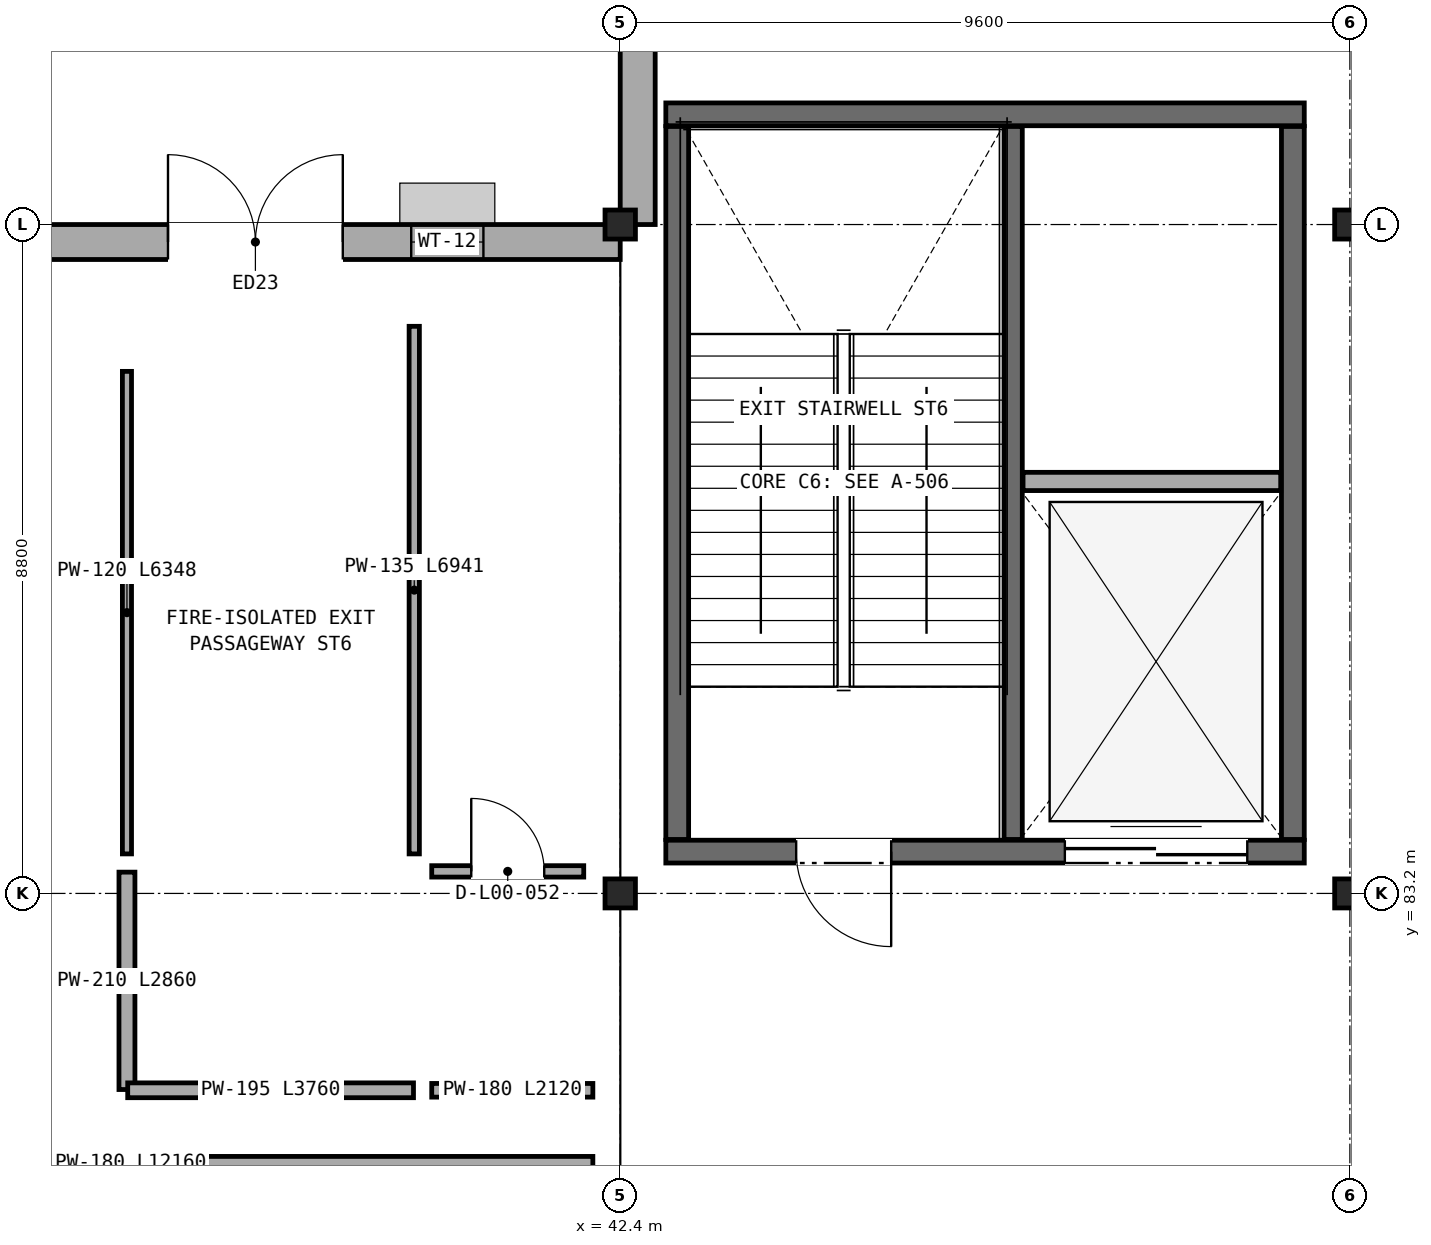
"""IFC4 building model, lengths in metres.
Left out: names, types, materials, properties, quantities, classifications, styles, units other than length and angle.
Written with IfcOpenShell. Run it as: python <this file> out.ifc"""

import sys

from ifc_helpers import new_model, si_unit, direction, frame, frame_2d, origin, origin_2d, place, context, subcontext, project, spatial, rectangle, i_section, extrude, element, fill, save


model = new_model("IFC4")
c1 = context("Model", 3, precision=1e-05, world=origin(), true_north=direction((0.0, 1.0)))
c2 = subcontext(c1, "Body", "Model", "MODEL_VIEW")
j1 = project(units=[si_unit("LENGTHUNIT", "METRE"), si_unit("PLANEANGLEUNIT", "RADIAN")], contexts=[c1])
p1 = place(None, origin())
s1 = spatial("IfcSite", under=j1, at=p1, CompositionType="ELEMENT")
p2 = place(p1, origin())
s2 = spatial("IfcBuilding", under=s1, at=p2, CompositionType="ELEMENT")
p3 = place(p2, origin())
s3 = spatial("IfcBuildingStorey", under=s2, at=p3, CompositionType="ELEMENT", Elevation=0.0)
for number, where, z_axis, x_axis in (
    (1, (42.4, 83.2, 0.0), (0.0, 0.0, 1.0), (1.0, 0.0, 0.0)),
    (2, (42.4, 92.0, 0.0), (0.0, 0.0, 1.0), (1.0, 0.0, 0.0)),
    (3, (52.0, 83.2, 0.0), (0.0, 0.0, 1.0), (1.0, 0.0, 0.0)),
    (4, (52.0, 92.0, 0.0), (0.0, 0.0, 1.0), (1.0, 0.0, 0.0)),
):
    element("IfcColumn", number, at=place(p3, frame(where, z_axis=z_axis, x_axis=x_axis)), inside=s3, PredefinedType="COLUMN", context=c2, shape_type="SweptSolid", body=[
        extrude(i_section(OverallWidth=0.4, OverallDepth=0.382, WebThickness=0.025, FlangeThickness=0.036, at=origin_2d()), origin(), (0.0, 0.0, 1.0), 5.6),
    ])
p4 = place(p3, frame((42.63, 114.964, 0.0), z_axis=(0.0, 0.0, 1.0), x_axis=(0.0, -1.0, 0.0)))
e5 = element("IfcWall", 5, at=p4, inside=s3, PredefinedType="SOLIDWALL", context=c2, shape_type="SweptSolid", body=[
    extrude(rectangle(XDim=22.964, YDim=0.46, at=frame_2d((11.482, 0.0))), origin(), (0.0, 0.0, 1.0), 4.653),
])
p5 = place(p4, frame((1.8, 0.0, 0.9)))
e6 = element("IfcOpeningElement", 6, at=p5, cuts=e5, PredefinedType="OPENING", context=c2, shape_type="SweptSolid", body=[
    extrude(rectangle(XDim=2.4, YDim=1.55, at=frame_2d((1.2, 0.775))), frame((0.0, 0.24, 0.0), z_axis=(0.0, -1.0, 0.0), x_axis=(1.0, 0.0, 0.0)), (0.0, 0.0, 1.0), 0.48),
])
p6 = place(p4, frame((15.6, 0.0, 0.9)))
e7 = element("IfcOpeningElement", 7, at=p6, cuts=e5, PredefinedType="OPENING", context=c2, shape_type="SweptSolid", body=[
    extrude(rectangle(XDim=2.65, YDim=1.55, at=frame_2d((1.325, 0.775))), frame((0.0, 0.24, 0.0), z_axis=(0.0, -1.0, 0.0), x_axis=(1.0, 0.0, 0.0)), (0.0, 0.0, 1.0), 0.48),
])
p7 = place(p3, frame((42.4, 91.77, 0.0), z_axis=(0.0, 0.0, 1.0), x_axis=(-1.0, 0.0, 0.0)))
e8 = element("IfcWall", 8, at=p7, inside=s3, PredefinedType="SOLIDWALL", context=c2, shape_type="SweptSolid", body=[
    extrude(rectangle(XDim=28.8, YDim=0.46, at=frame_2d((14.4, 0.0))), origin(), (0.0, 0.0, 1.0), 4.723),
])
p8 = place(p7, frame((22.775, 0.0, 0.0)))
e9 = element("IfcOpeningElement", 9, at=p8, cuts=e8, PredefinedType="OPENING", context=c2, shape_type="SweptSolid", body=[
    extrude(rectangle(XDim=2.45, YDim=2.5, at=frame_2d((1.225, 1.25))), frame((0.0, 0.24, 0.0), z_axis=(0.0, -1.0, 0.0), x_axis=(1.0, 0.0, 0.0)), (0.0, 0.0, 1.0), 0.48),
])
p9 = place(p7, frame((13.2, 0.0, 0.0)))
e10 = element("IfcOpeningElement", 10, at=p9, cuts=e8, PredefinedType="OPENING", context=c2, shape_type="SweptSolid", body=[
    extrude(rectangle(XDim=2.4, YDim=2.45, at=frame_2d((1.2, 1.225))), frame((0.0, 0.24, 0.0), z_axis=(0.0, -1.0, 0.0), x_axis=(1.0, 0.0, 0.0)), (0.0, 0.0, 1.0), 0.48),
])
p10 = place(p7, frame((3.65, 0.0, 0.0)))
e11 = element("IfcOpeningElement", 11, at=p10, cuts=e8, PredefinedType="OPENING", context=c2, shape_type="SweptSolid", body=[
    extrude(rectangle(XDim=2.3, YDim=2.4, at=frame_2d((1.15, 1.2))), frame((0.0, 0.24, 0.0), z_axis=(0.0, -1.0, 0.0), x_axis=(1.0, 0.0, 0.0)), (0.0, 0.0, 1.0), 0.48),
])
p11 = place(p7, frame((1.8, 0.0, 0.9)))
e12 = element("IfcOpeningElement", 12, at=p11, cuts=e8, PredefinedType="OPENING", context=c2, shape_type="SweptSolid", body=[
    extrude(rectangle(XDim=0.95, YDim=1.85, at=frame_2d((0.475, 0.925))), frame((0.0, 0.24, 0.0), z_axis=(0.0, -1.0, 0.0), x_axis=(1.0, 0.0, 0.0)), (0.0, 0.0, 1.0), 0.48),
])
p12 = place(p7, frame((11.0, 0.0, 0.9)))
e13 = element("IfcOpeningElement", 13, at=p12, cuts=e8, PredefinedType="OPENING", context=c2, shape_type="SweptSolid", body=[
    extrude(rectangle(XDim=1.1, YDim=1.85, at=frame_2d((0.55, 0.925))), frame((0.0, 0.24, 0.0), z_axis=(0.0, -1.0, 0.0), x_axis=(1.0, 0.0, 0.0)), (0.0, 0.0, 1.0), 0.48),
])
p13 = place(p7, frame((20.2, 0.0, 0.9)))
e14 = element("IfcOpeningElement", 14, at=p13, cuts=e8, PredefinedType="OPENING", context=c2, shape_type="SweptSolid", body=[
    extrude(rectangle(XDim=1.25, YDim=1.85, at=frame_2d((0.625, 0.925))), frame((0.0, 0.24, 0.0), z_axis=(0.0, -1.0, 0.0), x_axis=(1.0, 0.0, 0.0)), (0.0, 0.0, 1.0), 0.48),
])
p14 = place(p3, frame((43.0, 83.75, 0.0), z_axis=(0.0, 0.0, 1.0), x_axis=(1.0, 0.0, 0.0)))
e15 = element("IfcWall", 15, at=p14, inside=s3, PredefinedType="SHEAR", context=c2, shape_type="SweptSolid", body=[
    extrude(rectangle(XDim=8.4, YDim=0.3, at=frame_2d((4.2, 0.0))), origin(), (0.0, 0.0, 1.0), 5.275),
])
p15 = place(p14, frame((1.715, 0.0, 0.0)))
e16 = element("IfcOpeningElement", 16, at=p15, cuts=e15, PredefinedType="OPENING", context=c2, shape_type="SweptSolid", body=[
    extrude(rectangle(XDim=1.25, YDim=2.2, at=frame_2d((0.625, 1.1))), frame((0.0, 0.16, 0.0), z_axis=(0.0, -1.0, 0.0), x_axis=(1.0, 0.0, 0.0)), (0.0, 0.0, 1.0), 0.32),
])
p16 = place(p14, frame((5.25, 0.0, 0.0)))
e17 = element("IfcOpeningElement", 17, at=p16, cuts=e15, PredefinedType="OPENING", context=c2, shape_type="SweptSolid", body=[
    extrude(rectangle(XDim=2.4, YDim=2.55, at=frame_2d((1.2, 1.275))), frame((0.0, 0.16, 0.0), z_axis=(0.0, -1.0, 0.0), x_axis=(1.0, 0.0, 0.0)), (0.0, 0.0, 1.0), 0.32),
])
p17 = place(p3, frame((51.4, 93.45, 0.0), z_axis=(0.0, 0.0, 1.0), x_axis=(-1.0, 0.0, 0.0)))
e18 = element("IfcWall", 18, at=p17, inside=s3, PredefinedType="SHEAR", context=c2, shape_type="SweptSolid", body=[
    extrude(rectangle(XDim=8.4, YDim=0.3, at=frame_2d((4.2, 0.0))), origin(), (0.0, 0.0, 1.0), 5.275),
])
for number, where, z_axis, x_axis in (
    (19, (51.25, 83.91, 0.0), (0.0, 0.0, 1.0), (0.0, 1.0, 0.0)),
    (20, (43.15, 93.29, 0.0), (0.0, 0.0, 1.0), (0.0, -1.0, 0.0)),
):
    element("IfcWall", number, at=place(p3, frame(where, z_axis=z_axis, x_axis=x_axis)), inside=s3, PredefinedType="SHEAR", context=c2, shape_type="SweptSolid", body=[
        extrude(rectangle(XDim=9.38, YDim=0.3, at=frame_2d((4.69, 0.0))), origin(), (0.0, 0.0, 1.0), 5.275),
    ])
p18 = place(p3, frame((47.57, 83.91, 0.0), z_axis=(0.0, 0.0, 1.0), x_axis=(0.0, 1.0, 0.0)))
e21 = element("IfcWall", 21, at=p18, inside=s3, PredefinedType="SOLIDWALL", context=c2, shape_type="SweptSolid", body=[
    extrude(rectangle(XDim=9.38, YDim=0.24, at=frame_2d((4.69, 0.0))), origin(), (0.0, 0.0, 1.0), 5.275),
])
p19 = place(p3, frame((47.7, 88.62, 0.0), z_axis=(0.0, 0.0, 1.0), x_axis=(1.0, 0.0, 0.0)))
e22 = element("IfcWall", 22, at=p19, inside=s3, PredefinedType="SOLIDWALL", context=c2, shape_type="SweptSolid", body=[
    extrude(rectangle(XDim=3.39, YDim=0.24, at=frame_2d((1.695, 0.0))), origin(), (0.0, 0.0, 1.0), 5.275),
])
p20 = place(p3, frame((41.92, 83.49, 0.0), z_axis=(0.0, 0.0, 1.0), x_axis=(-1.0, 0.0, 0.0)))
e23 = element("IfcWall", 23, at=p20, inside=s3, PredefinedType="PARTITIONING", context=c2, shape_type="SweptSolid", body=[
    extrude(rectangle(XDim=2.0, YDim=0.15, at=frame_2d((1.0, 0.0))), origin(), (0.0, 0.0, 1.0), 4.708),
])
p21 = place(p20, frame((0.52, 0.0, 0.0)))
e24 = element("IfcOpeningElement", 24, at=p21, cuts=e23, PredefinedType="OPENING", context=c2, shape_type="SweptSolid", body=[
    extrude(rectangle(XDim=0.96, YDim=2.24, at=frame_2d((0.48, 1.12))), frame((0.0, 0.085, 0.0), z_axis=(0.0, -1.0, 0.0), x_axis=(1.0, 0.0, 0.0)), (0.0, 0.0, 1.0), 0.17),
])
p22 = place(p3, frame((39.69, 83.72, 0.0), z_axis=(0.0, 0.0, 1.0), x_axis=(0.0, 1.0, 0.0)))
e25 = element("IfcWall", 25, at=p22, inside=s3, PredefinedType="PARTITIONING", context=c2, shape_type="SweptSolid", body=[
    extrude(rectangle(XDim=6.941, YDim=0.135, at=frame_2d((3.47, 0.0))), origin(), (0.0, 0.0, 1.0), 5.064),
])
p23 = place(p3, frame((35.91, 90.068, 0.0), z_axis=(0.0, 0.0, 1.0), x_axis=(0.0, -1.0, 0.0)))
e26 = element("IfcWall", 26, at=p23, inside=s3, PredefinedType="PARTITIONING", context=c2, shape_type="SweptSolid", body=[
    extrude(rectangle(XDim=6.348, YDim=0.12, at=frame_2d((3.174, 0.0))), origin(), (0.0, 0.0, 1.0), 5.23),
])
p24 = place(p3, frame((35.91, 83.48, 0.0), z_axis=(0.0, 0.0, 1.0), x_axis=(0.0, -1.0, 0.0)))
e27 = element("IfcWall", 27, at=p24, inside=s3, PredefinedType="PARTITIONING", context=c2, shape_type="SweptSolid", body=[
    extrude(rectangle(XDim=2.86, YDim=0.21, at=frame_2d((1.43, 0.0))), origin(), (0.0, 0.0, 1.0), 4.708),
])
p25 = place(p3, frame((35.92, 80.61, 0.0), z_axis=(0.0, 0.0, 1.0), x_axis=(1.0, 0.0, 0.0)))
e28 = element("IfcWall", 28, at=p25, inside=s3, PredefinedType="PARTITIONING", context=c2, shape_type="SweptSolid", body=[
    extrude(rectangle(XDim=3.76, YDim=0.195, at=frame_2d((1.88, 0.0))), origin(), (0.0, 0.0, 1.0), 5.016),
])
p26 = place(p3, frame((39.92, 80.61, 0.0), z_axis=(0.0, 0.0, 1.0), x_axis=(1.0, 0.0, 0.0)))
e29 = element("IfcWall", 29, at=p26, inside=s3, PredefinedType="PARTITIONING", context=c2, shape_type="SweptSolid", body=[
    extrude(rectangle(XDim=2.12, YDim=0.18, at=frame_2d((1.06, 0.0))), origin(), (0.0, 0.0, 1.0), 5.016),
])
p27 = place(p3, frame((42.04, 79.65, 0.0), z_axis=(0.0, 0.0, 1.0), x_axis=(-1.0, 0.0, 0.0)))
e30 = element("IfcWall", 30, at=p27, inside=s3, PredefinedType="PARTITIONING", context=c2, shape_type="SweptSolid", body=[
    extrude(rectangle(XDim=12.16, YDim=0.18, at=frame_2d((6.08, 0.0))), origin(), (0.0, 0.0, 1.0), 4.787),
])
p28 = place(p10, frame((2.3, 0.0, 0.0), z_axis=(0.0, 0.0, 1.0), x_axis=(-1.0, 0.0, 0.0)))
e31 = element("IfcDoor", 31, at=p28, inside=s3, OperationType="DOUBLE_DOOR_SINGLE_SWING", PredefinedType="DOOR", context=c2, shape_type="SweptSolid", body=[
    extrude(rectangle(XDim=2.3, YDim=2.4, at=frame_2d((1.15, 1.2))), frame((0.0, 0.025, 0.0), z_axis=(0.0, -1.0, 0.0), x_axis=(1.0, 0.0, 0.0)), (0.0, 0.0, 1.0), 0.05),
])
fill(e11, e31)
p29 = place(p11, origin())
e32 = element("IfcWindow", 32, at=p29, inside=s3, PartitioningType="SINGLE_PANEL", PredefinedType="WINDOW", context=c2, shape_type="SweptSolid", body=[
    extrude(rectangle(XDim=0.95, YDim=1.85, at=frame_2d((0.475, 0.925))), frame((0.0, 0.03, 0.0), z_axis=(0.0, -1.0, 0.0), x_axis=(1.0, 0.0, 0.0)), (0.0, 0.0, 1.0), 0.06),
])
fill(e12, e32)
p30 = place(p15, frame((1.25, 0.0, 0.0), z_axis=(0.0, 0.0, 1.0), x_axis=(-1.0, 0.0, 0.0)))
e33 = element("IfcDoor", 33, at=p30, inside=s3, OperationType="SINGLE_SWING_RIGHT", PredefinedType="DOOR", context=c2, shape_type="SweptSolid", body=[
    extrude(rectangle(XDim=1.25, YDim=2.2, at=frame_2d((0.625, 1.1))), frame((0.0, 0.025, 0.0), z_axis=(0.0, -1.0, 0.0), x_axis=(1.0, 0.0, 0.0)), (0.0, 0.0, 1.0), 0.05),
])
fill(e16, e33)
p31 = place(p16, origin())
e34 = element("IfcDoor", 34, at=p31, inside=s3, OperationType="DOUBLE_DOOR_SLIDING", PredefinedType="DOOR", context=c2, shape_type="SweptSolid", body=[
    extrude(rectangle(XDim=2.4, YDim=2.55, at=frame_2d((1.2, 1.275))), frame((0.0, 0.025, 0.0), z_axis=(0.0, -1.0, 0.0), x_axis=(1.0, 0.0, 0.0)), (0.0, 0.0, 1.0), 0.05),
])
fill(e17, e34)
p32 = place(p21, frame((0.96, 0.0, 0.0), z_axis=(0.0, 0.0, 1.0), x_axis=(-1.0, 0.0, 0.0)))
e35 = element("IfcDoor", 35, at=p32, inside=s3, OperationType="SINGLE_SWING_RIGHT", PredefinedType="DOOR", context=c2, shape_type="SweptSolid", body=[
    extrude(rectangle(XDim=0.96, YDim=2.24, at=frame_2d((0.48, 1.12))), frame((0.0, 0.025, 0.0), z_axis=(0.0, -1.0, 0.0), x_axis=(1.0, 0.0, 0.0)), (0.0, 0.0, 1.0), 0.05),
])
fill(e24, e35)
save(model, sys.argv[1])
